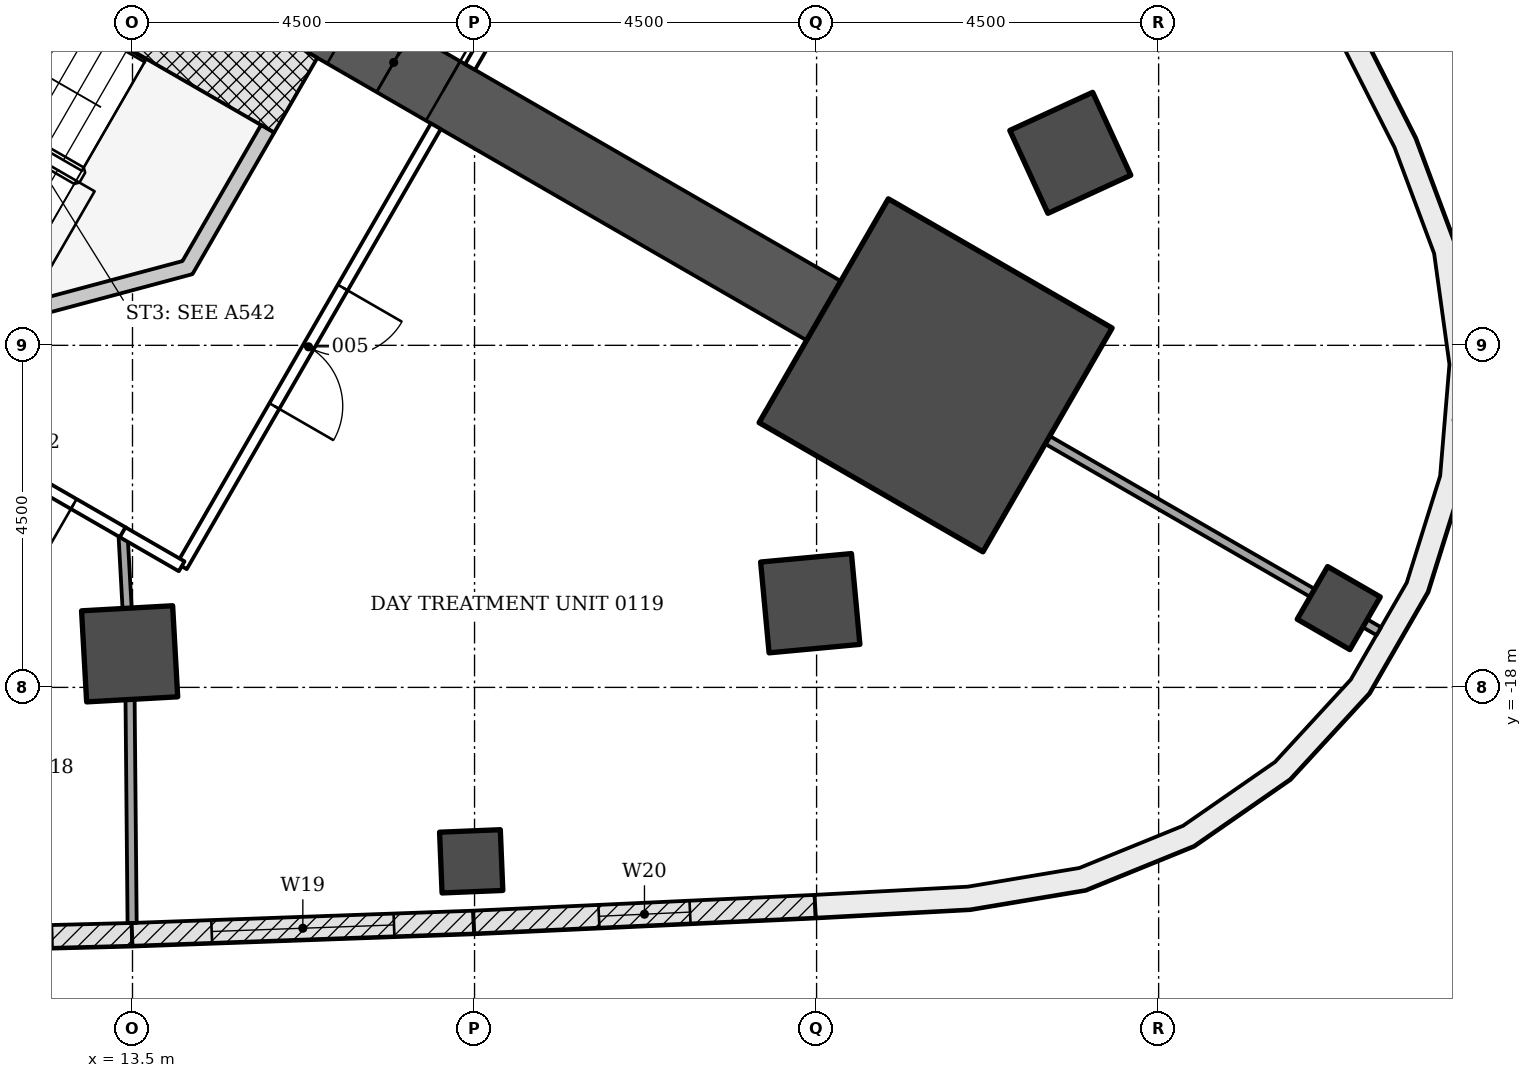
"""IFC4 building model, lengths in metres.
Left out: names, types, materials, properties, quantities, classifications, styles, units other than length and angle.
Written with IfcOpenShell. Run it as: python <this file> out.ifc"""

import sys

from ifc_helpers import new_model, si_unit, direction, frame, frame_2d, origin, origin_2d, place, context, subcontext, project, spatial, polyline, rectangle, outline, extrude, element, fill, save


model = new_model("IFC4")
c1 = context("Model", 3, precision=1e-05, world=origin(), true_north=direction((0.0, 1.0)))
c2 = subcontext(c1, "Body", "Model", "MODEL_VIEW")
j1 = project(units=[si_unit("LENGTHUNIT", "METRE"), si_unit("PLANEANGLEUNIT", "RADIAN")], contexts=[c1])
p1 = place(None, origin())
s1 = spatial("IfcSite", under=j1, at=p1, CompositionType="ELEMENT")
p2 = place(p1, origin())
s2 = spatial("IfcBuilding", under=s1, at=p2, CompositionType="ELEMENT")
p3 = place(p2, frame((0.0, 0.0, 6.0)))
s3 = spatial("IfcBuildingStorey", under=s2, at=p3, CompositionType="ELEMENT", Elevation=6.0)
for number, where, z_axis, x_axis in (
    (1, (13.462, -17.558, -0.25), (0.0, 0.0, 1.0), (0.056, -0.998, 0.0)),
    (2, (22.417, -16.893, -0.25), (0.0, 0.0, 1.0), (0.093, -0.996, 0.0)),
    (3, (25.838, -10.967, -0.25), (0.0, 0.0, 1.0), (0.909, 0.418, 0.0)),
):
    element("IfcColumn", number, at=place(p3, frame(where, z_axis=z_axis, x_axis=x_axis)), inside=s3, PredefinedType="COLUMN", context=c2, shape_type="SweptSolid", body=[
        extrude(rectangle(XDim=1.2, YDim=1.2, at=origin_2d()), origin(), (0.0, 0.0, 1.0), 4.5),
    ])
for number, where, z_axis, x_axis in (
    (4, (17.956, -20.288, -0.25), (0.0, 0.0, 1.0), (0.041, -0.999, 0.0)),
    (5, (29.37, -16.957, -0.25), (0.0, 0.0, 1.0), (0.866, -0.5, 0.0)),
):
    element("IfcColumn", number, at=place(p3, frame(where, z_axis=z_axis, x_axis=x_axis)), inside=s3, PredefinedType="COLUMN", context=c2, shape_type="SweptSolid", body=[
        extrude(rectangle(XDim=0.8, YDim=0.8, at=origin_2d()), origin(), (0.0, 0.0, 1.0), 4.5),
    ])
p4 = place(p3, frame((9.922, -5.728, -0.25), z_axis=(0.0, 0.0, 1.0), x_axis=(0.866028046028, -0.499995423472, 0.0)))
e6 = element("IfcWall", 6, at=p4, inside=s3, PredefinedType="SHEAR", context=c2, shape_type="SweptSolid", body=[
    extrude(rectangle(XDim=14.633, YDim=0.9, at=frame_2d((7.316, 0.0))), origin(), (0.0, 0.0, 1.0), 4.5),
])
p5 = place(p4, frame((7.35, 0.0, 0.25)))
e7 = element("IfcOpeningElement", 7, at=p5, cuts=e6, PredefinedType="OPENING", context=c2, shape_type="SweptSolid", body=[
    extrude(rectangle(XDim=1.5, YDim=2.1, at=frame_2d((0.75, 1.05))), frame((0.0, 0.46, 0.0), z_axis=(0.0, -1.0, 0.0), x_axis=(1.0, 0.0, 0.0)), (0.0, 0.0, 1.0), 0.92),
])
p6 = place(p3, frame((24.066, -13.895, -0.25), z_axis=(0.0, 0.0, 1.0), x_axis=(0.866025403784, -0.5, 0.0)))
e8 = element("IfcColumn", 8, at=p6, inside=s3, PredefinedType="COLUMN", context=c2, shape_type="SweptSolid", body=[
    extrude(rectangle(XDim=3.4, YDim=3.4, at=origin_2d()), origin(), (0.0, 0.0, 1.0), 4.5),
])
p7 = place(p3, frame((13.492, -21.25, 0.0), z_axis=(0.0, 0.0, 1.0), x_axis=(-0.999671466587, -0.025631209312, 0.0)))
e9 = element("IfcWall", 9, at=p7, inside=s3, PredefinedType="NOTDEFINED", context=c2, shape_type="SweptSolid", body=[
    extrude(rectangle(XDim=4.496, YDim=0.3, at=frame_2d((2.248, 0.0))), origin(), (0.0, 0.0, 1.0), 4.25),
])
p8 = place(p7, frame((1.048, 0.0, 0.9)))
e10 = element("IfcOpeningElement", 10, at=p8, cuts=e9, PredefinedType="OPENING", context=c2, shape_type="SweptSolid", body=[
    extrude(rectangle(XDim=2.4, YDim=2.4, at=frame_2d((1.2, 1.2))), frame((0.0, 0.16, 0.0), z_axis=(0.0, -1.0, 0.0), x_axis=(1.0, 0.0, 0.0)), (0.0, 0.0, 1.0), 0.32),
])
p9 = place(p3, frame((17.988, -21.088, 0.0), z_axis=(0.0, 0.0, 1.0), x_axis=(-0.999355640029, -0.035892962294, 0.0)))
e11 = element("IfcWall", 11, at=p9, inside=s3, PredefinedType="NOTDEFINED", context=c2, shape_type="SweptSolid", body=[
    extrude(rectangle(XDim=4.496, YDim=0.3, at=frame_2d((2.248, 0.0))), origin(), (0.0, 0.0, 1.0), 4.25),
])
p10 = place(p9, frame((1.048, 0.0, 0.9)))
e12 = element("IfcOpeningElement", 12, at=p10, cuts=e11, PredefinedType="OPENING", context=c2, shape_type="SweptSolid", body=[
    extrude(rectangle(XDim=2.4, YDim=2.4, at=frame_2d((1.2, 1.2))), frame((0.0, 0.16, 0.0), z_axis=(0.0, -1.0, 0.0), x_axis=(1.0, 0.0, 0.0)), (0.0, 0.0, 1.0), 0.32),
])
p11 = place(p3, frame((22.481, -20.88, 0.0), z_axis=(0.0, 0.0, 1.0), x_axis=(-0.998931717866, -0.046210637742, 0.0)))
e13 = element("IfcWall", 13, at=p11, inside=s3, PredefinedType="NOTDEFINED", context=c2, shape_type="SweptSolid", body=[
    extrude(rectangle(XDim=4.496, YDim=0.3, at=frame_2d((2.248, 0.0))), origin(), (0.0, 0.0, 1.0), 4.25),
])
p12 = place(p11, frame((1.648, 0.0, 0.8)))
e14 = element("IfcOpeningElement", 14, at=p12, cuts=e13, PredefinedType="OPENING", context=c2, shape_type="SweptSolid", body=[
    extrude(rectangle(XDim=1.2, YDim=3.0, at=frame_2d((0.6, 1.5))), frame((0.0, 0.16, 0.0), z_axis=(0.0, -1.0, 0.0), x_axis=(1.0, 0.0, 0.0)), (0.0, 0.0, 1.0), 0.32),
])
p13 = place(p3, origin())
e15 = element("IfcWall", 15, at=p13, inside=s3, PredefinedType="NOTDEFINED", context=c2, shape_type="SweptSolid", body=[
    extrude(outline(polyline([(22.49, -21.03), (24.522, -20.921), (26.04, -20.666), (27.465, -20.086), (28.729, -19.209), (29.771, -18.077), (30.54, -16.744), (31.0, -15.276), (31.128, -13.742), (30.917, -12.218), (30.379, -10.776), (29.457, -8.962), (29.19, -9.098), (30.104, -10.897), (30.625, -12.292), (30.826, -13.75), (30.704, -15.218), (30.264, -16.623), (29.528, -17.898), (28.531, -18.981), (27.321, -19.821), (25.957, -20.376), (24.489, -20.622), (22.474, -20.73), (22.49, -21.03)])), origin(), (0.0, 0.0, 1.0), 4.25),
])
p14 = place(p3, frame((9.413, -6.61, -0.25), z_axis=(0.0, 0.0, 1.0), x_axis=(0.866018442252, -0.500012057535, 0.0)))
e16 = element("IfcWall", 16, at=p14, inside=s3, PredefinedType="SHEAR", context=c2, shape_type="SweptSolid", body=[
    extrude(rectangle(XDim=7.2, YDim=1.136, at=frame_2d((3.6, 0.0))), origin(), (0.0, 0.0, 1.0), 4.5),
])
p15 = place(p3, frame((0.0, 0.0, -0.25)))
e17 = element("IfcWall", 17, at=p15, inside=s3, PredefinedType="SHEAR", context=c2, shape_type="SweptSolid", body=[
    extrude(outline(polyline([(12.104, -13.149), (14.289, -12.563), (15.364, -10.701), (15.191, -10.601), (14.157, -12.392), (12.132, -12.934), (12.204, -12.976), (12.204, -12.976), (12.204, -12.976), (12.204, -12.976), (12.204, -12.976), (12.204, -12.976), (12.204, -12.976), (12.204, -12.976), (12.204, -12.976), (12.204, -12.976), (12.204, -12.976), (12.204, -12.976), (12.204, -12.976), (12.204, -12.976), (12.204, -12.976), (12.204, -12.976), (12.204, -12.976), (12.104, -13.149)])), origin(), (0.0, 0.0, 1.0), 4.5),
])
p16 = place(p3, frame((13.429, -16.959, 0.0), z_axis=(0.0, 0.0, 1.0), x_axis=(-0.055063393043, 0.998482860517, 0.0)))
e18 = element("IfcWall", 18, at=p16, inside=s3, PredefinedType="PARTITIONING", context=c2, shape_type="SweptSolid", body=[
    extrude(rectangle(XDim=0.998, YDim=0.12, at=frame_2d((0.499, 0.0))), origin(), (0.0, 0.0, 1.0), 3.638),
])
p17 = place(p3, frame((13.495, -21.099, 0.0), z_axis=(0.0, 0.0, 1.0), x_axis=(-0.009216581037, 0.999957526415, 0.0)))
e19 = element("IfcWall", 19, at=p17, inside=s3, PredefinedType="PARTITIONING", context=c2, shape_type="SweptSolid", body=[
    extrude(rectangle(XDim=2.94, YDim=0.12, at=frame_2d((1.47, 0.0))), origin(), (0.0, 0.0, 1.0), 3.633),
])
p18 = place(p3, frame((13.377, -15.962, 0.0), z_axis=(0.0, 0.0, 1.0), x_axis=(-0.866302389159, 0.499519940081, 0.0)))
e20 = element("IfcWall", 20, at=p18, inside=s3, PredefinedType="PARTITIONING", context=c2, shape_type="SweptSolid", body=[
    extrude(rectangle(XDim=2.47, YDim=0.15, at=frame_2d((1.235, 0.0))), origin(), (0.0, 0.0, 1.0), 3.638),
])
p19 = place(p18, frame((0.75, 0.0, 0.0)))
e21 = element("IfcOpeningElement", 21, at=p19, cuts=e20, PredefinedType="OPENING", context=c2, shape_type="SweptSolid", body=[
    extrude(rectangle(XDim=1.0, YDim=2.1, at=frame_2d((0.5, 1.05))), frame((0.0, 0.085, 0.0), z_axis=(0.0, -1.0, 0.0), x_axis=(1.0, 0.0, 0.0)), (0.0, 0.0, 1.0), 0.17),
])
p20 = place(p3, frame((17.491, -10.618, 0.0), z_axis=(0.0, 0.0, 1.0), x_axis=(-0.499969057507, -0.866043267704, 0.0)))
e22 = element("IfcWall", 22, at=p20, inside=s3, PredefinedType="PARTITIONING", context=c2, shape_type="SweptSolid", body=[
    extrude(rectangle(XDim=6.685, YDim=0.15, at=frame_2d((3.342, 0.0))), origin(), (0.0, 0.0, 1.0), 3.638),
])
p21 = place(p20, frame((2.45, 0.0, 0.0)))
e23 = element("IfcOpeningElement", 23, at=p21, cuts=e22, PredefinedType="OPENING", context=c2, shape_type="SweptSolid", body=[
    extrude(rectangle(XDim=1.8, YDim=2.1, at=frame_2d((0.9, 1.05))), frame((0.0, 0.085, 0.0), z_axis=(0.0, -1.0, 0.0), x_axis=(1.0, 0.0, 0.0)), (0.0, 0.0, 1.0), 0.17),
])
p22 = place(p3, frame((14.147, -16.407, 0.0), z_axis=(0.0, 0.0, 1.0), x_axis=(-0.866276218641, 0.499565324075, 0.0)))
e24 = element("IfcWall", 24, at=p22, inside=s3, PredefinedType="PARTITIONING", context=c2, shape_type="SweptSolid", body=[
    extrude(rectangle(XDim=0.897, YDim=0.15, at=frame_2d((0.448, 0.0))), origin(), (0.0, 0.0, 1.0), 3.638),
])
p23 = place(p3, frame((29.023, -16.757, 0.0), z_axis=(0.0, 0.0, 1.0), x_axis=(-0.866027971625, 0.499995552344, 0.0)))
e25 = element("IfcWall", 25, at=p23, inside=s3, PredefinedType="PARTITIONING", context=c2, shape_type="SweptSolid", body=[
    extrude(rectangle(XDim=4.024, YDim=0.12, at=frame_2d((2.012, 0.0))), origin(), (0.0, 0.0, 1.0), 3.717),
])
p24 = place(p3, frame((29.896, -17.261, 0.0), z_axis=(0.0, 0.0, 1.0), x_axis=(-0.865774595023, 0.500434162116, 0.0)))
e26 = element("IfcWall", 26, at=p24, inside=s3, PredefinedType="PARTITIONING", context=c2, shape_type="SweptSolid", body=[
    extrude(rectangle(XDim=0.208, YDim=0.12, at=frame_2d((0.104, 0.0))), origin(), (0.0, 0.0, 1.0), 4.25),
])
p25 = place(p3, frame((18.84, -8.281, 0.0), z_axis=(0.0, 0.0, 1.0), x_axis=(-0.500126010714, -0.86595263924, 0.0)))
e27 = element("IfcWall", 27, at=p25, inside=s3, PredefinedType="PARTITIONING", context=c2, shape_type="SweptSolid", body=[
    extrude(rectangle(XDim=1.798, YDim=0.15, at=frame_2d((0.899, 0.0))), origin(), (0.0, 0.0, 1.0), 3.638),
])
p26 = place(p8, origin())
e28 = element("IfcWindow", 28, at=p26, inside=s3, PartitioningType="DOUBLE_PANEL_VERTICAL", PredefinedType="WINDOW", context=c2, shape_type="SweptSolid", body=[
    extrude(rectangle(XDim=2.4, YDim=2.4, at=frame_2d((1.2, 1.2))), frame((0.0, 0.03, 0.0), z_axis=(0.0, -1.0, 0.0), x_axis=(1.0, 0.0, 0.0)), (0.0, 0.0, 1.0), 0.06),
])
fill(e10, e28)
p27 = place(p10, origin())
e29 = element("IfcWindow", 29, at=p27, inside=s3, PartitioningType="DOUBLE_PANEL_VERTICAL", PredefinedType="WINDOW", context=c2, shape_type="SweptSolid", body=[
    extrude(rectangle(XDim=2.4, YDim=2.4, at=frame_2d((1.2, 1.2))), frame((0.0, 0.03, 0.0), z_axis=(0.0, -1.0, 0.0), x_axis=(1.0, 0.0, 0.0)), (0.0, 0.0, 1.0), 0.06),
])
fill(e12, e29)
p28 = place(p12, origin())
e30 = element("IfcWindow", 30, at=p28, inside=s3, PartitioningType="SINGLE_PANEL", PredefinedType="WINDOW", context=c2, shape_type="SweptSolid", body=[
    extrude(rectangle(XDim=1.2, YDim=3.0, at=frame_2d((0.6, 1.5))), frame((0.0, 0.03, 0.0), z_axis=(0.0, -1.0, 0.0), x_axis=(1.0, 0.0, 0.0)), (0.0, 0.0, 1.0), 0.06),
])
fill(e14, e30)
p29 = place(p19, origin())
e31 = element("IfcDoor", 31, at=p29, inside=s3, OperationType="SINGLE_SWING_RIGHT", PredefinedType="DOOR", context=c2, shape_type="SweptSolid", body=[
    extrude(rectangle(XDim=1.0, YDim=2.1, at=frame_2d((0.5, 1.05))), frame((0.0, 0.025, 0.0), z_axis=(0.0, -1.0, 0.0), x_axis=(1.0, 0.0, 0.0)), (0.0, 0.0, 1.0), 0.05),
])
fill(e21, e31)
p30 = place(p21, origin())
e32 = element("IfcDoor", 32, at=p30, inside=s3, OperationType="DOUBLE_DOOR_SINGLE_SWING", PredefinedType="DOOR", context=c2, shape_type="SweptSolid", body=[
    extrude(rectangle(XDim=1.8, YDim=2.1, at=frame_2d((0.9, 1.05))), frame((0.0, 0.025, 0.0), z_axis=(0.0, -1.0, 0.0), x_axis=(1.0, 0.0, 0.0)), (0.0, 0.0, 1.0), 0.05),
])
fill(e23, e32)
p31 = place(p5, origin())
e33 = element("IfcDoor", 33, at=p31, inside=s3, OperationType="DOUBLE_DOOR_SINGLE_SWING", PredefinedType="DOOR", context=c2, shape_type="SweptSolid", body=[
    extrude(rectangle(XDim=1.5, YDim=2.1, at=frame_2d((0.75, 1.05))), frame((0.0, 0.025, 0.0), z_axis=(0.0, -1.0, 0.0), x_axis=(1.0, 0.0, 0.0)), (0.0, 0.0, 1.0), 0.05),
])
fill(e7, e33)
save(model, sys.argv[1])
